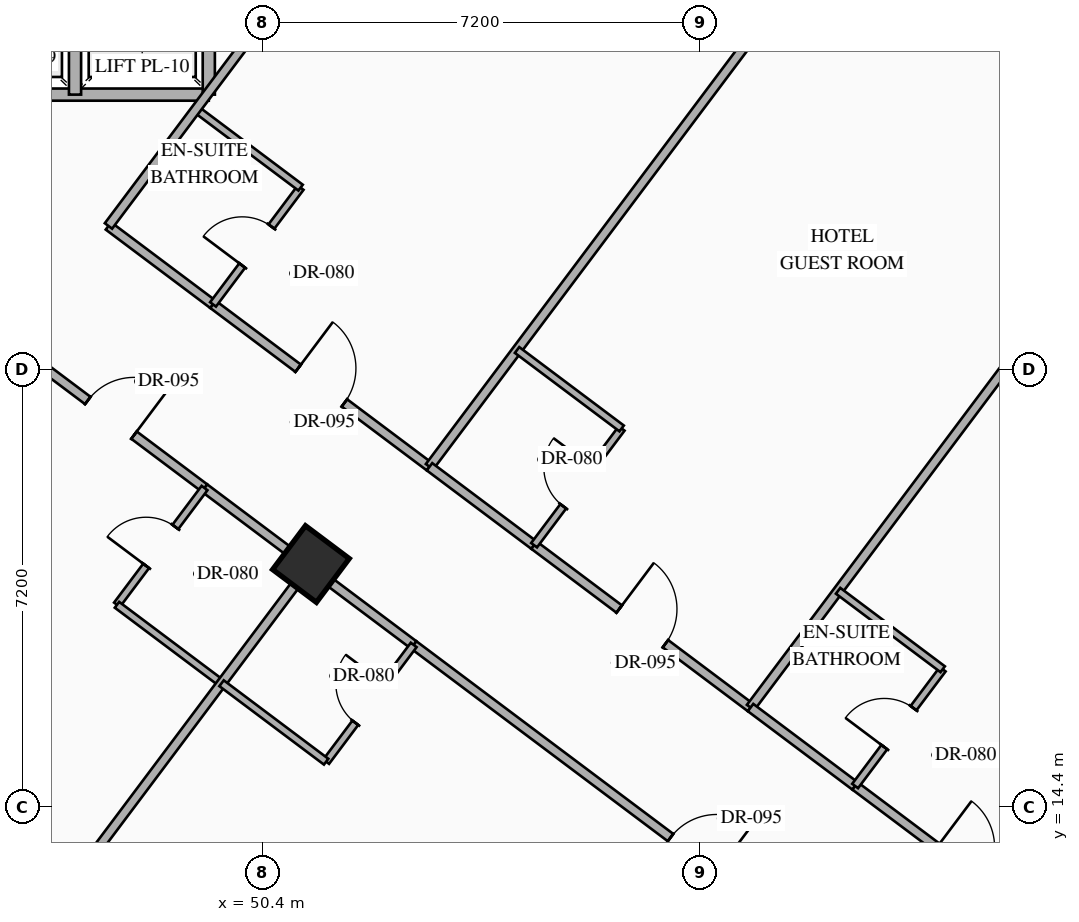
"""IFC4 building model, lengths in metres.
Left out: names, types, materials, properties, quantities, classifications, styles, units other than length and angle.
Written with IfcOpenShell. Run it as: python <this file> out.ifc"""

import sys

from ifc_helpers import new_model, si_unit, direction, frame, frame_2d, origin, origin_2d, place, context, subcontext, project, spatial, rectangle, hollow_rectangle, extrude, element, fill, save


model = new_model("IFC4")
c1 = context("Model", 3, precision=1e-05, world=origin(), true_north=direction((0.0, 1.0)))
c2 = subcontext(c1, "Body", "Model", "MODEL_VIEW")
j1 = project(units=[si_unit("LENGTHUNIT", "METRE"), si_unit("PLANEANGLEUNIT", "RADIAN")], contexts=[c1])
p1 = place(None, origin())
s1 = spatial("IfcSite", under=j1, at=p1, CompositionType="ELEMENT")
p2 = place(p1, origin())
s2 = spatial("IfcBuilding", under=s1, at=p2, CompositionType="ELEMENT")
p3 = place(p2, frame((0.0, 0.0, 77.95)))
s3 = spatial("IfcBuildingStorey", under=s2, at=p3, CompositionType="ELEMENT", Elevation=77.95)
p4 = place(p3, frame((51.2, 18.4, 0.0), z_axis=(0.0, 0.0, 1.0), x_axis=(0.799999996291, -0.600000004945, 0.0)))
e1 = element("IfcColumn", 1, at=p4, inside=s3, PredefinedType="COLUMN", context=c2, shape_type="SweptSolid", body=[
    extrude(hollow_rectangle(XDim=0.9, YDim=0.9, WallThickness=0.036, at=origin_2d()), origin(), (0.0, 0.0, 1.0), 3.35),
])
p5 = place(p3, frame((44.86, 40.73, 0.0), z_axis=(0.0, 0.0, 1.0), x_axis=(0.800006902154, -0.599990797017, 0.0)))
e2 = element("IfcWall", 2, at=p5, inside=s3, PredefinedType="STANDARD", context=c2, shape_type="SweptSolid", body=[
    extrude(rectangle(XDim=29.712, YDim=0.28, at=frame_2d((14.856, 0.0))), origin(), (0.0, 0.0, 1.0), 3.13),
])
p6 = place(p5, frame((14.249, 0.0, 0.0)))
e3 = element("IfcOpeningElement", 3, at=p6, cuts=e2, PredefinedType="OPENING", context=c2, shape_type="SweptSolid", body=[
    extrude(rectangle(XDim=1.1, YDim=2.2, at=frame_2d((0.55, 1.1))), frame((0.0, 0.15, 0.0), z_axis=(0.0, -1.0, 0.0), x_axis=(1.0, 0.0, 0.0)), (0.0, 0.0, 1.0), 0.3),
])
p7 = place(p5, frame((1.612, 0.0, 0.85)))
e4 = element("IfcOpeningElement", 4, at=p7, cuts=e2, PredefinedType="OPENING", context=c2, shape_type="SweptSolid", body=[
    extrude(rectangle(XDim=1.4, YDim=1.8, at=frame_2d((0.7, 0.9))), frame((0.0, 0.15, 0.0), z_axis=(0.0, -1.0, 0.0), x_axis=(1.0, 0.0, 0.0)), (0.0, 0.0, 1.0), 0.3),
])
p8 = place(p5, frame((5.667, 0.0, 0.85)))
e5 = element("IfcOpeningElement", 5, at=p8, cuts=e2, PredefinedType="OPENING", context=c2, shape_type="SweptSolid", body=[
    extrude(rectangle(XDim=1.4, YDim=1.8, at=frame_2d((0.7, 0.9))), frame((0.0, 0.15, 0.0), z_axis=(0.0, -1.0, 0.0), x_axis=(1.0, 0.0, 0.0)), (0.0, 0.0, 1.0), 0.3),
])
p9 = place(p5, frame((9.912, 0.0, 0.85)))
e6 = element("IfcOpeningElement", 6, at=p9, cuts=e2, PredefinedType="OPENING", context=c2, shape_type="SweptSolid", body=[
    extrude(rectangle(XDim=1.4, YDim=1.8, at=frame_2d((0.7, 0.9))), frame((0.0, 0.15, 0.0), z_axis=(0.0, -1.0, 0.0), x_axis=(1.0, 0.0, 0.0)), (0.0, 0.0, 1.0), 0.3),
])
p10 = place(p5, frame((19.743, 0.0, 0.85)))
e7 = element("IfcOpeningElement", 7, at=p10, cuts=e2, PredefinedType="OPENING", context=c2, shape_type="SweptSolid", body=[
    extrude(rectangle(XDim=1.4, YDim=1.8, at=frame_2d((0.7, 0.9))), frame((0.0, 0.15, 0.0), z_axis=(0.0, -1.0, 0.0), x_axis=(1.0, 0.0, 0.0)), (0.0, 0.0, 1.0), 0.3),
])
p11 = place(p5, frame((22.645, 0.0, 0.85)))
e8 = element("IfcOpeningElement", 8, at=p11, cuts=e2, PredefinedType="OPENING", context=c2, shape_type="SweptSolid", body=[
    extrude(rectangle(XDim=1.4, YDim=1.8, at=frame_2d((0.7, 0.9))), frame((0.0, 0.15, 0.0), z_axis=(0.0, -1.0, 0.0), x_axis=(1.0, 0.0, 0.0)), (0.0, 0.0, 1.0), 0.3),
])
p12 = place(p5, frame((26.7, 0.0, 0.85)))
e9 = element("IfcOpeningElement", 9, at=p12, cuts=e2, PredefinedType="OPENING", context=c2, shape_type="SweptSolid", body=[
    extrude(rectangle(XDim=1.4, YDim=1.8, at=frame_2d((0.7, 0.9))), frame((0.0, 0.15, 0.0), z_axis=(0.0, -1.0, 0.0), x_axis=(1.0, 0.0, 0.0)), (0.0, 0.0, 1.0), 0.3),
])
p13 = place(p3, frame((53.318, 2.487, 0.0), z_axis=(0.0, 0.0, 1.0), x_axis=(-0.800004174678, 0.599994433723, 0.0)))
e10 = element("IfcWall", 10, at=p13, inside=s3, PredefinedType="STANDARD", context=c2, shape_type="SweptSolid", body=[
    extrude(rectangle(XDim=35.089, YDim=0.28, at=frame_2d((17.544, 0.0))), origin(), (0.0, 0.0, 1.0), 3.13),
])
p14 = place(p13, frame((1.931, 0.0, 0.85)))
e11 = element("IfcOpeningElement", 11, at=p14, cuts=e10, PredefinedType="OPENING", context=c2, shape_type="SweptSolid", body=[
    extrude(rectangle(XDim=1.4, YDim=1.8, at=frame_2d((0.7, 0.9))), frame((0.0, 0.15, 0.0), z_axis=(0.0, -1.0, 0.0), x_axis=(1.0, 0.0, 0.0)), (0.0, 0.0, 1.0), 0.3),
])
p15 = place(p13, frame((6.819, 0.0, 0.85)))
e12 = element("IfcOpeningElement", 12, at=p15, cuts=e10, PredefinedType="OPENING", context=c2, shape_type="SweptSolid", body=[
    extrude(rectangle(XDim=1.4, YDim=1.8, at=frame_2d((0.7, 0.9))), frame((0.0, 0.15, 0.0), z_axis=(0.0, -1.0, 0.0), x_axis=(1.0, 0.0, 0.0)), (0.0, 0.0, 1.0), 0.3),
])
p16 = place(p13, frame((11.832, 0.0, 0.85)))
e13 = element("IfcOpeningElement", 13, at=p16, cuts=e10, PredefinedType="OPENING", context=c2, shape_type="SweptSolid", body=[
    extrude(rectangle(XDim=1.4, YDim=1.8, at=frame_2d((0.7, 0.9))), frame((0.0, 0.15, 0.0), z_axis=(0.0, -1.0, 0.0), x_axis=(1.0, 0.0, 0.0)), (0.0, 0.0, 1.0), 0.3),
])
p17 = place(p13, frame((17.647, 0.0, 0.85)))
e14 = element("IfcOpeningElement", 14, at=p17, cuts=e10, PredefinedType="OPENING", context=c2, shape_type="SweptSolid", body=[
    extrude(rectangle(XDim=1.4, YDim=1.8, at=frame_2d((0.7, 0.9))), frame((0.0, 0.15, 0.0), z_axis=(0.0, -1.0, 0.0), x_axis=(1.0, 0.0, 0.0)), (0.0, 0.0, 1.0), 0.3),
])
p18 = place(p13, frame((21.857, 0.0, 0.85)))
e15 = element("IfcOpeningElement", 15, at=p18, cuts=e10, PredefinedType="OPENING", context=c2, shape_type="SweptSolid", body=[
    extrude(rectangle(XDim=1.4, YDim=1.8, at=frame_2d((0.7, 0.9))), frame((0.0, 0.15, 0.0), z_axis=(0.0, -1.0, 0.0), x_axis=(1.0, 0.0, 0.0)), (0.0, 0.0, 1.0), 0.3),
])
p19 = place(p13, frame((26.87, 0.0, 0.85)))
e16 = element("IfcOpeningElement", 16, at=p19, cuts=e10, PredefinedType="OPENING", context=c2, shape_type="SweptSolid", body=[
    extrude(rectangle(XDim=1.4, YDim=1.8, at=frame_2d((0.7, 0.9))), frame((0.0, 0.15, 0.0), z_axis=(0.0, -1.0, 0.0), x_axis=(1.0, 0.0, 0.0)), (0.0, 0.0, 1.0), 0.3),
])
p20 = place(p13, frame((31.757, 0.0, 0.85)))
e17 = element("IfcOpeningElement", 17, at=p20, cuts=e10, PredefinedType="OPENING", context=c2, shape_type="SweptSolid", body=[
    extrude(rectangle(XDim=1.4, YDim=1.8, at=frame_2d((0.7, 0.9))), frame((0.0, 0.15, 0.0), z_axis=(0.0, -1.0, 0.0), x_axis=(1.0, 0.0, 0.0)), (0.0, 0.0, 1.0), 0.3),
])
p21 = place(p3, frame((45.12, 26.12, 0.0), z_axis=(0.0, 0.0, 1.0), x_axis=(1.0, 0.0, 0.0)))
e18 = element("IfcWall", 18, at=p21, inside=s3, PredefinedType="STANDARD", context=c2, shape_type="SweptSolid", body=[
    extrude(rectangle(XDim=4.4, YDim=0.2, at=frame_2d((2.2, 0.0))), origin(), (0.0, 0.0, 1.0), 3.13),
])
for number, where, z_axis, x_axis in (
    (19, (49.52, 26.12, 0.0), (0.0, 0.0, 1.0), (0.0, 1.0, 0.0)),
    (20, (47.32, 26.12, 0.0), (0.0, 0.0, 1.0), (0.0, 1.0, 0.0)),
):
    element("IfcWall", number, at=place(p3, frame(where, z_axis=z_axis, x_axis=x_axis)), inside=s3, PredefinedType="STANDARD", context=c2, shape_type="SweptSolid", body=[
        extrude(rectangle(XDim=2.16, YDim=0.2, at=frame_2d((1.08, 0.0))), origin(), (0.0, 0.0, 1.0), 3.13),
    ])
p22 = place(p3, frame((47.87, 23.96, 0.0), z_axis=(0.0, 0.0, 1.0), x_axis=(0.79998637334, -0.60001816845, 0.0)))
e21 = element("IfcWall", 21, at=p22, inside=s3, PredefinedType="PARTITIONING", context=c2, shape_type="SweptSolid", body=[
    extrude(rectangle(XDim=2.15, YDim=0.15, at=frame_2d((1.075, 0.0))), origin(), (0.0, 0.0, 1.0), 2.775),
])
p23 = place(p3, frame((49.59, 22.67, 0.0), z_axis=(0.0, 0.0, 1.0), x_axis=(0.799993416095, -0.600008778439, 0.0)))
e22 = element("IfcWall", 22, at=p23, inside=s3, PredefinedType="PARTITIONING", context=c2, shape_type="SweptSolid", body=[
    extrude(rectangle(XDim=4.45, YDim=0.15, at=frame_2d((2.225, 0.0))), origin(), (0.0, 0.0, 1.0), 2.775),
])
p24 = place(p23, frame((1.75, 0.0, 0.0)))
e23 = element("IfcOpeningElement", 23, at=p24, cuts=e22, PredefinedType="OPENING", context=c2, shape_type="SweptSolid", body=[
    extrude(rectangle(XDim=0.95, YDim=2.15, at=frame_2d((0.475, 1.075))), frame((0.0, 0.085, 0.0), z_axis=(0.0, -1.0, 0.0), x_axis=(1.0, 0.0, 0.0)), (0.0, 0.0, 1.0), 0.17),
])
p25 = place(p3, frame((49.59, 22.67, 0.0), z_axis=(0.0, 0.0, 1.0), x_axis=(0.599951172744, 0.800036618114, 0.0)))
e24 = element("IfcWall", 24, at=p25, inside=s3, PredefinedType="PARTITIONING", context=c2, shape_type="SweptSolid", body=[
    extrude(rectangle(XDim=2.4, YDim=0.12, at=frame_2d((1.2, 0.0))), origin(), (0.0, 0.0, 1.0), 3.13),
])
p26 = place(p25, frame((0.8, 0.0, 0.0)))
e25 = element("IfcOpeningElement", 25, at=p26, cuts=e24, PredefinedType="OPENING", context=c2, shape_type="SweptSolid", body=[
    extrude(rectangle(XDim=0.8, YDim=2.06, at=frame_2d((0.4, 1.03))), frame((0.0, 0.07, 0.0), z_axis=(0.0, -1.0, 0.0), x_axis=(1.0, 0.0, 0.0)), (0.0, 0.0, 1.0), 0.14),
])
p27 = place(p3, frame((49.31, 25.88, 0.0), z_axis=(0.0, 0.0, 1.0), x_axis=(0.800040880289, -0.59994548908, 0.0)))
e26 = element("IfcWall", 26, at=p27, inside=s3, PredefinedType="PARTITIONING", context=c2, shape_type="SweptSolid", body=[
    extrude(rectangle(XDim=2.15, YDim=0.12, at=frame_2d((1.075, 0.0))), origin(), (0.0, 0.0, 1.0), 3.13),
])
for number, where, z_axis, x_axis in (
    (27, (47.87, 23.96, 0.0), (0.0, 0.0, 1.0), (0.6, 0.8, 0.0)),
    (28, (53.15, 20.0, 0.0), (0.0, 0.0, 1.0), (0.6, 0.8, 0.0)),
):
    element("IfcWall", number, at=place(p3, frame(where, z_axis=z_axis, x_axis=x_axis)), inside=s3, PredefinedType="PARTITIONING", context=c2, shape_type="SweptSolid", body=[
        extrude(rectangle(XDim=11.55, YDim=0.15, at=frame_2d((5.775, 0.0))), origin(), (0.0, 0.0, 1.0), 3.13),
    ])
p28 = place(p3, frame((53.15, 20.0, 0.0), z_axis=(0.0, 0.0, 1.0), x_axis=(0.800027249606, -0.599963665473, 0.0)))
e29 = element("IfcWall", 29, at=p28, inside=s3, PredefinedType="PARTITIONING", context=c2, shape_type="SweptSolid", body=[
    extrude(rectangle(XDim=2.15, YDim=0.15, at=frame_2d((1.075, 0.0))), origin(), (0.0, 0.0, 1.0), 2.775),
])
p29 = place(p3, frame((54.87, 18.71, 0.0), z_axis=(0.0, 0.0, 1.0), x_axis=(0.799993416095, -0.600008778439, 0.0)))
e30 = element("IfcWall", 30, at=p29, inside=s3, PredefinedType="PARTITIONING", context=c2, shape_type="SweptSolid", body=[
    extrude(rectangle(XDim=4.45, YDim=0.15, at=frame_2d((2.225, 0.0))), origin(), (0.0, 0.0, 1.0), 2.775),
])
p30 = place(p29, frame((1.75, 0.0, 0.0)))
e31 = element("IfcOpeningElement", 31, at=p30, cuts=e30, PredefinedType="OPENING", context=c2, shape_type="SweptSolid", body=[
    extrude(rectangle(XDim=0.95, YDim=2.15, at=frame_2d((0.475, 1.075))), frame((0.0, 0.085, 0.0), z_axis=(0.0, -1.0, 0.0), x_axis=(1.0, 0.0, 0.0)), (0.0, 0.0, 1.0), 0.17),
])
p31 = place(p3, frame((54.87, 18.71, 0.0), z_axis=(0.0, 0.0, 1.0), x_axis=(0.6, 0.8, 0.0)))
e32 = element("IfcWall", 32, at=p31, inside=s3, PredefinedType="PARTITIONING", context=c2, shape_type="SweptSolid", body=[
    extrude(rectangle(XDim=2.4, YDim=0.12, at=frame_2d((1.2, 0.0))), origin(), (0.0, 0.0, 1.0), 3.13),
])
p32 = place(p31, frame((0.8, 0.0, 0.0)))
e33 = element("IfcOpeningElement", 33, at=p32, cuts=e32, PredefinedType="OPENING", context=c2, shape_type="SweptSolid", body=[
    extrude(rectangle(XDim=0.8, YDim=2.06, at=frame_2d((0.4, 1.03))), frame((0.0, 0.07, 0.0), z_axis=(0.0, -1.0, 0.0), x_axis=(1.0, 0.0, 0.0)), (0.0, 0.0, 1.0), 0.14),
])
p33 = place(p3, frame((54.59, 21.92, 0.0), z_axis=(0.0, 0.0, 1.0), x_axis=(0.79998637334, -0.60001816845, 0.0)))
e34 = element("IfcWall", 34, at=p33, inside=s3, PredefinedType="PARTITIONING", context=c2, shape_type="SweptSolid", body=[
    extrude(rectangle(XDim=2.15, YDim=0.12, at=frame_2d((1.075, 0.0))), origin(), (0.0, 0.0, 1.0), 3.13),
])
p34 = place(p3, frame((58.43, 16.04, 0.0), z_axis=(0.0, 0.0, 1.0), x_axis=(0.60001014597, 0.799992390422, 0.0)))
e35 = element("IfcWall", 35, at=p34, inside=s3, PredefinedType="PARTITIONING", context=c2, shape_type="SweptSolid", body=[
    extrude(rectangle(XDim=11.55, YDim=0.15, at=frame_2d((5.775, 0.0))), origin(), (0.0, 0.0, 1.0), 3.13),
])
p35 = place(p3, frame((58.43, 16.04, 0.0), z_axis=(0.0, 0.0, 1.0), x_axis=(0.79998637334, -0.60001816845, 0.0)))
e36 = element("IfcWall", 36, at=p35, inside=s3, PredefinedType="PARTITIONING", context=c2, shape_type="SweptSolid", body=[
    extrude(rectangle(XDim=2.15, YDim=0.15, at=frame_2d((1.075, 0.0))), origin(), (0.0, 0.0, 1.0), 2.775),
])
p36 = place(p3, frame((60.15, 14.75, 0.0), z_axis=(0.0, 0.0, 1.0), x_axis=(0.800006797429, -0.599990936654, 0.0)))
e37 = element("IfcWall", 37, at=p36, inside=s3, PredefinedType="PARTITIONING", context=c2, shape_type="SweptSolid", body=[
    extrude(rectangle(XDim=4.31, YDim=0.15, at=frame_2d((2.155, 0.0))), origin(), (0.0, 0.0, 1.0), 2.775),
])
p37 = place(p36, frame((1.68, 0.0, 0.0)))
e38 = element("IfcOpeningElement", 38, at=p37, cuts=e37, PredefinedType="OPENING", context=c2, shape_type="SweptSolid", body=[
    extrude(rectangle(XDim=0.95, YDim=2.15, at=frame_2d((0.475, 1.075))), frame((0.0, 0.085, 0.0), z_axis=(0.0, -1.0, 0.0), x_axis=(1.0, 0.0, 0.0)), (0.0, 0.0, 1.0), 0.17),
])
p38 = place(p3, frame((60.15, 14.75, 0.0), z_axis=(0.0, 0.0, 1.0), x_axis=(0.600065100855, 0.79995117022, 0.0)))
e39 = element("IfcWall", 39, at=p38, inside=s3, PredefinedType="PARTITIONING", context=c2, shape_type="SweptSolid", body=[
    extrude(rectangle(XDim=2.4, YDim=0.12, at=frame_2d((1.2, 0.0))), origin(), (0.0, 0.0, 1.0), 3.13),
])
p39 = place(p38, frame((0.8, 0.0, 0.0)))
e40 = element("IfcOpeningElement", 40, at=p39, cuts=e39, PredefinedType="OPENING", context=c2, shape_type="SweptSolid", body=[
    extrude(rectangle(XDim=0.8, YDim=2.06, at=frame_2d((0.4, 1.03))), frame((0.0, 0.07, 0.0), z_axis=(0.0, -1.0, 0.0), x_axis=(1.0, 0.0, 0.0)), (0.0, 0.0, 1.0), 0.14),
])
p40 = place(p3, frame((59.87, 17.96, 0.0), z_axis=(0.0, 0.0, 1.0), x_axis=(0.79998637334, -0.60001816845, 0.0)))
e41 = element("IfcWall", 41, at=p40, inside=s3, PredefinedType="PARTITIONING", context=c2, shape_type="SweptSolid", body=[
    extrude(rectangle(XDim=2.15, YDim=0.12, at=frame_2d((1.075, 0.0))), origin(), (0.0, 0.0, 1.0), 3.13),
])
p41 = place(p3, frame((46.37, 21.96, 0.0), z_axis=(0.0, 0.0, 1.0), x_axis=(0.799977170108, -0.600030438649, 0.0)))
e42 = element("IfcWall", 42, at=p41, inside=s3, PredefinedType="PARTITIONING", context=c2, shape_type="SweptSolid", body=[
    extrude(rectangle(XDim=3.85, YDim=0.15, at=frame_2d((1.925, 0.0))), origin(), (0.0, 0.0, 1.0), 2.425),
])
p42 = place(p41, frame((1.45, 0.0, 0.0)))
e43 = element("IfcOpeningElement", 43, at=p42, cuts=e42, PredefinedType="OPENING", context=c2, shape_type="SweptSolid", body=[
    extrude(rectangle(XDim=0.95, YDim=2.15, at=frame_2d((0.475, 1.075))), frame((0.0, 0.085, 0.0), z_axis=(0.0, -1.0, 0.0), x_axis=(1.0, 0.0, 0.0)), (0.0, 0.0, 1.0), 0.17),
])
p43 = place(p3, frame((49.45, 19.65, 0.0), z_axis=(0.0, 0.0, 1.0), x_axis=(0.800040880289, -0.59994548908, 0.0)))
e44 = element("IfcWall", 44, at=p43, inside=s3, PredefinedType="PARTITIONING", context=c2, shape_type="SweptSolid", body=[
    extrude(rectangle(XDim=2.15, YDim=0.15, at=frame_2d((1.075, 0.0))), origin(), (0.0, 0.0, 1.0), 2.425),
])
p44 = place(p3, frame((48.01, 17.73, 0.0), z_axis=(0.0, 0.0, 1.0), x_axis=(0.6, 0.8, 0.0)))
e45 = element("IfcWall", 45, at=p44, inside=s3, PredefinedType="PARTITIONING", context=c2, shape_type="SweptSolid", body=[
    extrude(rectangle(XDim=2.4, YDim=0.12, at=frame_2d((1.2, 0.0))), origin(), (0.0, 0.0, 1.0), 3.13),
])
p45 = place(p44, frame((0.8, 0.0, 0.0)))
e46 = element("IfcOpeningElement", 46, at=p45, cuts=e45, PredefinedType="OPENING", context=c2, shape_type="SweptSolid", body=[
    extrude(rectangle(XDim=0.8, YDim=2.06, at=frame_2d((0.4, 1.03))), frame((0.0, 0.07, 0.0), z_axis=(0.0, -1.0, 0.0), x_axis=(1.0, 0.0, 0.0)), (0.0, 0.0, 1.0), 0.14),
])
p46 = place(p3, frame((48.01, 17.73, 0.0), z_axis=(0.0, 0.0, 1.0), x_axis=(0.79998637334, -0.60001816845, 0.0)))
e47 = element("IfcWall", 47, at=p46, inside=s3, PredefinedType="PARTITIONING", context=c2, shape_type="SweptSolid", body=[
    extrude(rectangle(XDim=2.15, YDim=0.12, at=frame_2d((1.075, 0.0))), origin(), (0.0, 0.0, 1.0), 3.13),
])
p47 = place(p3, frame((44.36, 9.28, 0.0), z_axis=(0.0, 0.0, 1.0), x_axis=(0.599986233332, 0.800010324816, 0.0)))
e48 = element("IfcWall", 48, at=p47, inside=s3, PredefinedType="PARTITIONING", context=c2, shape_type="SweptSolid", body=[
    extrude(rectangle(XDim=11.35, YDim=0.15, at=frame_2d((5.675, 0.0))), origin(), (0.0, 0.0, 1.0), 2.425),
])
p48 = place(p3, frame((51.17, 18.36, 0.0), z_axis=(0.0, 0.0, 1.0), x_axis=(0.79998637334, -0.60001816845, 0.0)))
e49 = element("IfcWall", 49, at=p48, inside=s3, PredefinedType="PARTITIONING", context=c2, shape_type="SweptSolid", body=[
    extrude(rectangle(XDim=2.15, YDim=0.15, at=frame_2d((1.075, 0.0))), origin(), (0.0, 0.0, 1.0), 2.425),
])
p49 = place(p3, frame((52.89, 17.07, 0.0), z_axis=(0.0, 0.0, 1.0), x_axis=(0.8, -0.6, 0.0)))
e50 = element("IfcWall", 50, at=p49, inside=s3, PredefinedType="PARTITIONING", context=c2, shape_type="SweptSolid", body=[
    extrude(rectangle(XDim=11.51, YDim=0.15, at=frame_2d((5.755, 0.0))), origin(), (0.0, 0.0, 1.0), 2.425),
])
p50 = place(p49, frame((5.28, 0.0, 0.0)))
e51 = element("IfcOpeningElement", 51, at=p50, cuts=e50, PredefinedType="OPENING", context=c2, shape_type="SweptSolid", body=[
    extrude(rectangle(XDim=0.95, YDim=2.15, at=frame_2d((0.475, 1.075))), frame((0.0, 0.085, 0.0), z_axis=(0.0, -1.0, 0.0), x_axis=(1.0, 0.0, 0.0)), (0.0, 0.0, 1.0), 0.17),
])
p51 = place(p3, frame((51.45, 15.15, 0.0), z_axis=(0.0, 0.0, 1.0), x_axis=(0.599951172744, 0.800036618114, 0.0)))
e52 = element("IfcWall", 52, at=p51, inside=s3, PredefinedType="PARTITIONING", context=c2, shape_type="SweptSolid", body=[
    extrude(rectangle(XDim=2.4, YDim=0.12, at=frame_2d((1.2, 0.0))), origin(), (0.0, 0.0, 1.0), 3.13),
])
p52 = place(p51, frame((0.8, 0.0, 0.0)))
e53 = element("IfcOpeningElement", 53, at=p52, cuts=e52, PredefinedType="OPENING", context=c2, shape_type="SweptSolid", body=[
    extrude(rectangle(XDim=0.8, YDim=2.06, at=frame_2d((0.4, 1.03))), frame((0.0, 0.07, 0.0), z_axis=(0.0, -1.0, 0.0), x_axis=(1.0, 0.0, 0.0)), (0.0, 0.0, 1.0), 0.14),
])
p53 = place(p3, frame((49.73, 16.44, 0.0), z_axis=(0.0, 0.0, 1.0), x_axis=(0.79998637334, -0.60001816845, 0.0)))
e54 = element("IfcWall", 54, at=p53, inside=s3, PredefinedType="PARTITIONING", context=c2, shape_type="SweptSolid", body=[
    extrude(rectangle(XDim=2.15, YDim=0.12, at=frame_2d((1.075, 0.0))), origin(), (0.0, 0.0, 1.0), 3.13),
])
p54 = place(p24, origin())
e55 = element("IfcDoor", 55, at=p54, inside=s3, OperationType="SINGLE_SWING_LEFT", PredefinedType="DOOR", context=c2, shape_type="SweptSolid", body=[
    extrude(rectangle(XDim=0.95, YDim=2.15, at=frame_2d((0.475, 1.075))), frame((0.0, 0.025, 0.0), z_axis=(0.0, -1.0, 0.0), x_axis=(1.0, 0.0, 0.0)), (0.0, 0.0, 1.0), 0.05),
])
fill(e23, e55)
p55 = place(p26, origin())
e56 = element("IfcDoor", 56, at=p55, inside=s3, OperationType="SINGLE_SWING_LEFT", PredefinedType="DOOR", context=c2, shape_type="SweptSolid", body=[
    extrude(rectangle(XDim=0.8, YDim=2.06, at=frame_2d((0.4, 1.03))), frame((0.0, 0.025, 0.0), z_axis=(0.0, -1.0, 0.0), x_axis=(1.0, 0.0, 0.0)), (0.0, 0.0, 1.0), 0.05),
])
fill(e25, e56)
p56 = place(p30, origin())
e57 = element("IfcDoor", 57, at=p56, inside=s3, OperationType="SINGLE_SWING_LEFT", PredefinedType="DOOR", context=c2, shape_type="SweptSolid", body=[
    extrude(rectangle(XDim=0.95, YDim=2.15, at=frame_2d((0.475, 1.075))), frame((0.0, 0.025, 0.0), z_axis=(0.0, -1.0, 0.0), x_axis=(1.0, 0.0, 0.0)), (0.0, 0.0, 1.0), 0.05),
])
fill(e31, e57)
p57 = place(p32, origin())
e58 = element("IfcDoor", 58, at=p57, inside=s3, OperationType="SINGLE_SWING_RIGHT", PredefinedType="DOOR", context=c2, shape_type="SweptSolid", body=[
    extrude(rectangle(XDim=0.8, YDim=2.06, at=frame_2d((0.4, 1.03))), frame((0.0, 0.025, 0.0), z_axis=(0.0, -1.0, 0.0), x_axis=(1.0, 0.0, 0.0)), (0.0, 0.0, 1.0), 0.05),
])
fill(e33, e58)
p58 = place(p39, origin())
e59 = element("IfcDoor", 59, at=p58, inside=s3, OperationType="SINGLE_SWING_LEFT", PredefinedType="DOOR", context=c2, shape_type="SweptSolid", body=[
    extrude(rectangle(XDim=0.8, YDim=2.06, at=frame_2d((0.4, 1.03))), frame((0.0, 0.025, 0.0), z_axis=(0.0, -1.0, 0.0), x_axis=(1.0, 0.0, 0.0)), (0.0, 0.0, 1.0), 0.05),
])
fill(e40, e59)
p59 = place(p42, origin())
e60 = element("IfcDoor", 60, at=p59, inside=s3, OperationType="SINGLE_SWING_RIGHT", PredefinedType="DOOR", context=c2, shape_type="SweptSolid", body=[
    extrude(rectangle(XDim=0.95, YDim=2.15, at=frame_2d((0.475, 1.075))), frame((0.0, 0.025, 0.0), z_axis=(0.0, -1.0, 0.0), x_axis=(1.0, 0.0, 0.0)), (0.0, 0.0, 1.0), 0.05),
])
fill(e43, e60)
p60 = place(p45, origin())
e61 = element("IfcDoor", 61, at=p60, inside=s3, OperationType="SINGLE_SWING_LEFT", PredefinedType="DOOR", context=c2, shape_type="SweptSolid", body=[
    extrude(rectangle(XDim=0.8, YDim=2.06, at=frame_2d((0.4, 1.03))), frame((0.0, 0.025, 0.0), z_axis=(0.0, -1.0, 0.0), x_axis=(1.0, 0.0, 0.0)), (0.0, 0.0, 1.0), 0.05),
])
fill(e46, e61)
p61 = place(p50, origin())
e62 = element("IfcDoor", 62, at=p61, inside=s3, OperationType="SINGLE_SWING_RIGHT", PredefinedType="DOOR", context=c2, shape_type="SweptSolid", body=[
    extrude(rectangle(XDim=0.95, YDim=2.15, at=frame_2d((0.475, 1.075))), frame((0.0, 0.025, 0.0), z_axis=(0.0, -1.0, 0.0), x_axis=(1.0, 0.0, 0.0)), (0.0, 0.0, 1.0), 0.05),
])
fill(e51, e62)
p62 = place(p52, origin())
e63 = element("IfcDoor", 63, at=p62, inside=s3, OperationType="SINGLE_SWING_RIGHT", PredefinedType="DOOR", context=c2, shape_type="SweptSolid", body=[
    extrude(rectangle(XDim=0.8, YDim=2.06, at=frame_2d((0.4, 1.03))), frame((0.0, 0.025, 0.0), z_axis=(0.0, -1.0, 0.0), x_axis=(1.0, 0.0, 0.0)), (0.0, 0.0, 1.0), 0.05),
])
fill(e53, e63)
save(model, sys.argv[1])
